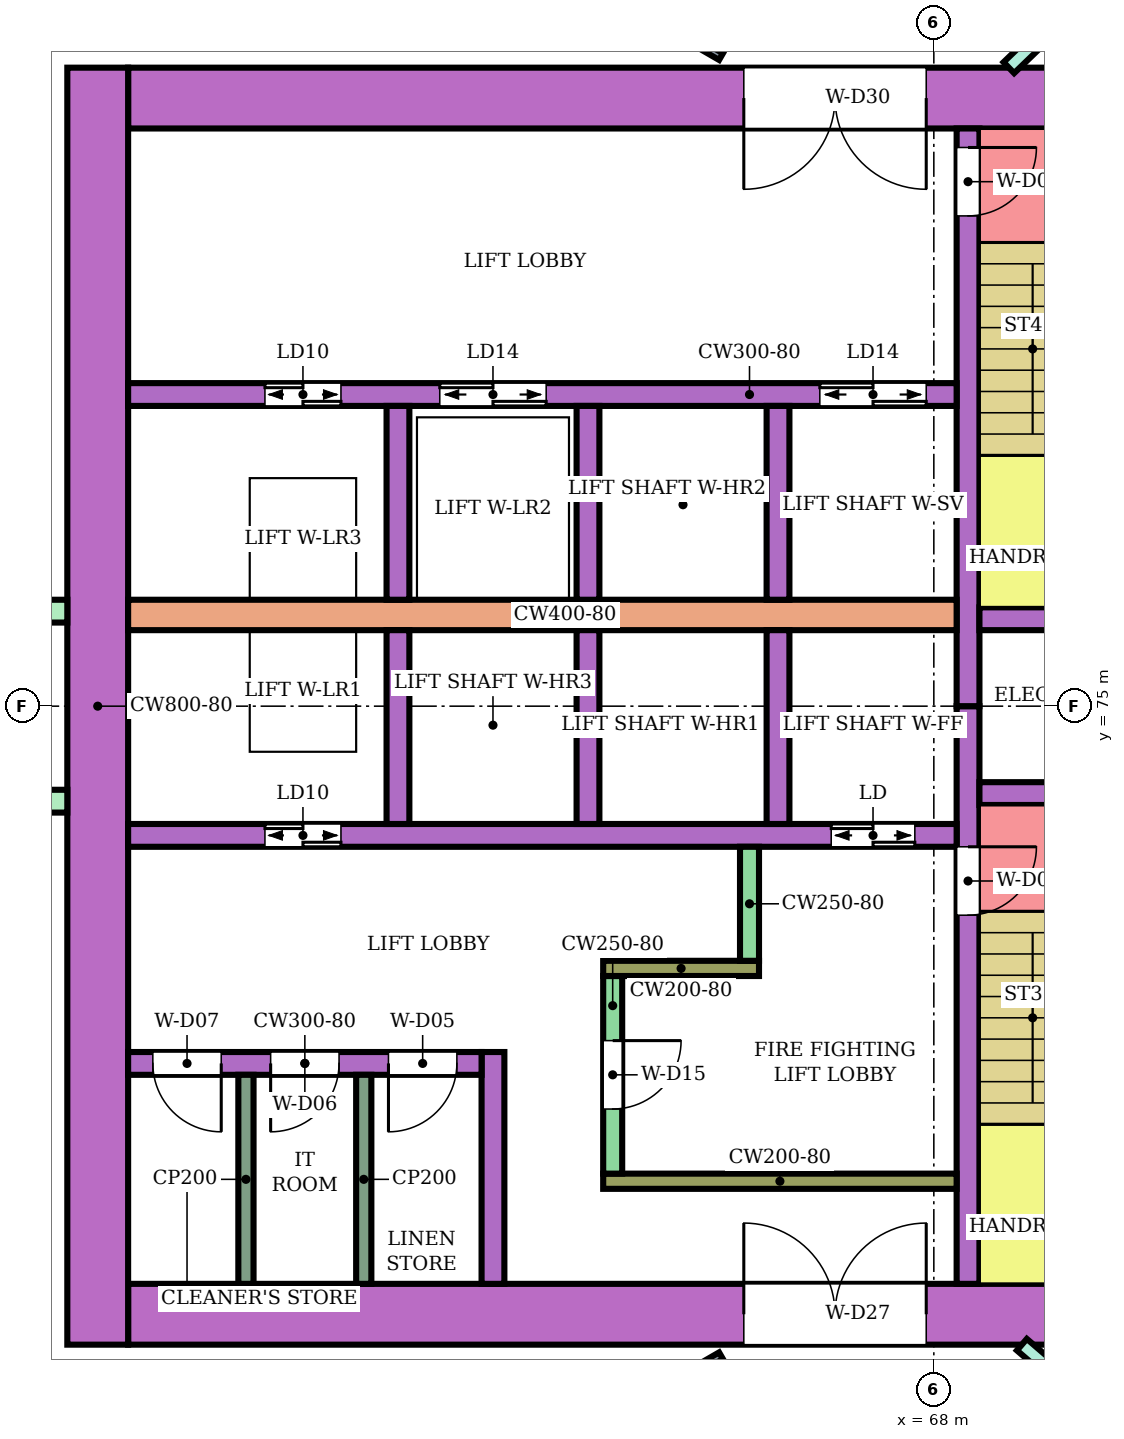
"""IFC4 building model, lengths in metres.
Left out: names, types, materials, properties, quantities, classifications, styles, units other than length and angle.
Written with IfcOpenShell. Run it as: python <this file> out.ifc"""

import sys

from ifc_helpers import new_model, si_unit, direction, frame, frame_2d, origin, place, context, subcontext, project, spatial, rectangle, extrude, element, fill, save


model = new_model("IFC4")
c1 = context("Model", 3, precision=1e-05, world=origin(), true_north=direction((0.0, 1.0)))
c2 = subcontext(c1, "Body", "Model", "MODEL_VIEW")
j1 = project(units=[si_unit("LENGTHUNIT", "METRE"), si_unit("PLANEANGLEUNIT", "RADIAN")], contexts=[c1])
p1 = place(None, origin())
s1 = spatial("IfcSite", under=j1, at=p1, CompositionType="ELEMENT")
p2 = place(p1, origin())
s2 = spatial("IfcBuilding", under=s1, at=p2, CompositionType="ELEMENT")
p3 = place(p2, frame((0.0, 0.0, 51.6)))
s3 = spatial("IfcBuildingStorey", under=s2, at=p3, CompositionType="ELEMENT", Elevation=51.6)
p4 = place(p3, frame((72.1, 67.0, 0.0), z_axis=(0.0, 0.0, 1.0), x_axis=(-1.0, 0.0, 0.0)))
e1 = element("IfcWall", 1, at=p4, inside=s3, PredefinedType="SHEAR", context=c2, shape_type="SweptSolid", body=[
    extrude(rectangle(XDim=14.7, YDim=0.8, at=frame_2d((7.35, 0.0))), origin(), (0.0, 0.0, 1.0), 3.48),
])
p5 = place(p4, frame((4.2, 0.0, 0.0)))
e2 = element("IfcOpeningElement", 2, at=p5, cuts=e1, PredefinedType="OPENING", context=c2, shape_type="SweptSolid", body=[
    extrude(rectangle(XDim=2.4, YDim=2.4, at=frame_2d((1.2, 1.2))), frame((0.0, 0.41, 0.0), z_axis=(0.0, -1.0, 0.0), x_axis=(1.0, 0.0, 0.0)), (0.0, 0.0, 1.0), 0.82),
])
p6 = place(p3, frame((72.1, 83.0, 0.0), z_axis=(0.0, 0.0, 1.0), x_axis=(-1.0, 0.0, 0.0)))
e3 = element("IfcWall", 3, at=p6, inside=s3, PredefinedType="SHEAR", context=c2, shape_type="SweptSolid", body=[
    extrude(rectangle(XDim=14.7, YDim=0.8, at=frame_2d((7.35, 0.0))), origin(), (0.0, 0.0, 1.0), 3.48),
])
p7 = place(p6, frame((4.2, 0.0, 0.0)))
e4 = element("IfcOpeningElement", 4, at=p7, cuts=e3, PredefinedType="OPENING", context=c2, shape_type="SweptSolid", body=[
    extrude(rectangle(XDim=2.4, YDim=2.4, at=frame_2d((1.2, 1.2))), frame((0.0, 0.41, 0.0), z_axis=(0.0, -1.0, 0.0), x_axis=(1.0, 0.0, 0.0)), (0.0, 0.0, 1.0), 0.82),
])
p8 = place(p3, frame((57.0, 83.4, 0.0), z_axis=(0.0, 0.0, 1.0), x_axis=(0.0, -1.0, 0.0)))
e5 = element("IfcWall", 5, at=p8, inside=s3, PredefinedType="SHEAR", context=c2, shape_type="SweptSolid", body=[
    extrude(rectangle(XDim=16.8, YDim=0.8, at=frame_2d((8.4, 0.0))), origin(), (0.0, 0.0, 1.0), 3.48),
])
p9 = place(p3, frame((68.45, 75.0, 0.0), z_axis=(0.0, 0.0, 1.0), x_axis=(0.0, -1.0, 0.0)))
e6 = element("IfcWall", 6, at=p9, inside=s3, PredefinedType="SHEAR", context=c2, shape_type="SweptSolid", body=[
    extrude(rectangle(XDim=7.6, YDim=0.3, at=frame_2d((3.8, 0.0))), origin(), (0.0, 0.0, 1.0), 3.48),
])
p10 = place(p9, frame((1.85, 0.0, 0.0)))
e7 = element("IfcOpeningElement", 7, at=p10, cuts=e6, PredefinedType="OPENING", context=c2, shape_type="SweptSolid", body=[
    extrude(rectangle(XDim=0.9, YDim=2.1, at=frame_2d((0.45, 1.05))), frame((0.0, 0.16, 0.0), z_axis=(0.0, -1.0, 0.0), x_axis=(1.0, 0.0, 0.0)), (0.0, 0.0, 1.0), 0.32),
])
p11 = place(p3, frame((68.45, 82.6, 0.0), z_axis=(0.0, 0.0, 1.0), x_axis=(0.0, -1.0, 0.0)))
e8 = element("IfcWall", 8, at=p11, inside=s3, PredefinedType="SHEAR", context=c2, shape_type="SweptSolid", body=[
    extrude(rectangle(XDim=7.6, YDim=0.3, at=frame_2d((3.8, 0.0))), origin(), (0.0, 0.0, 1.0), 3.48),
])
p12 = place(p11, frame((0.25, 0.0, 0.0)))
e9 = element("IfcOpeningElement", 9, at=p12, cuts=e8, PredefinedType="OPENING", context=c2, shape_type="SweptSolid", body=[
    extrude(rectangle(XDim=0.9, YDim=2.1, at=frame_2d((0.45, 1.05))), frame((0.0, 0.16, 0.0), z_axis=(0.0, -1.0, 0.0), x_axis=(1.0, 0.0, 0.0)), (0.0, 0.0, 1.0), 0.32),
])
p13 = place(p3, frame((71.65, 73.85, 0.0), z_axis=(0.0, 0.0, 1.0), x_axis=(-1.0, 0.0, 0.0)))
e10 = element("IfcWall", 10, at=p13, inside=s3, PredefinedType="SHEAR", context=c2, shape_type="SweptSolid", body=[
    extrude(rectangle(XDim=3.05, YDim=0.3, at=frame_2d((1.525, 0.0))), origin(), (0.0, 0.0, 1.0), 3.48),
])
p14 = place(p13, frame((1.1, 0.0, 0.0)))
e11 = element("IfcOpeningElement", 11, at=p14, cuts=e10, PredefinedType="OPENING", context=c2, shape_type="SweptSolid", body=[
    extrude(rectangle(XDim=0.7, YDim=2.0, at=frame_2d((0.35, 1.0))), frame((0.0, 0.16, 0.0), z_axis=(0.0, -1.0, 0.0), x_axis=(1.0, 0.0, 0.0)), (0.0, 0.0, 1.0), 0.32),
])
p15 = place(p3, frame((71.65, 76.15, 0.0), z_axis=(0.0, 0.0, 1.0), x_axis=(-1.0, 0.0, 0.0)))
e12 = element("IfcWall", 12, at=p15, inside=s3, PredefinedType="SHEAR", context=c2, shape_type="SweptSolid", body=[
    extrude(rectangle(XDim=3.05, YDim=0.3, at=frame_2d((1.525, 0.0))), origin(), (0.0, 0.0, 1.0), 3.48),
])
p16 = place(p3, frame((68.3, 73.3, 0.0), z_axis=(0.0, 0.0, 1.0), x_axis=(-1.0, 0.0, 0.0)))
e13 = element("IfcWall", 13, at=p16, inside=s3, PredefinedType="SHEAR", context=c2, shape_type="SweptSolid", body=[
    extrude(rectangle(XDim=10.9, YDim=0.3, at=frame_2d((5.45, 0.0))), origin(), (0.0, 0.0, 1.0), 3.48),
])
p17 = place(p16, frame((0.55, 0.0, 0.0)))
e14 = element("IfcOpeningElement", 14, at=p17, cuts=e13, PredefinedType="OPENING", context=c2, shape_type="SweptSolid", body=[
    extrude(rectangle(XDim=1.1, YDim=2.1, at=frame_2d((0.55, 1.05))), frame((0.0, 0.16, 0.0), z_axis=(0.0, -1.0, 0.0), x_axis=(1.0, 0.0, 0.0)), (0.0, 0.0, 1.0), 0.32),
])
p18 = place(p16, frame((8.1, 0.0, 0.0)))
e15 = element("IfcOpeningElement", 15, at=p18, cuts=e13, PredefinedType="OPENING", context=c2, shape_type="SweptSolid", body=[
    extrude(rectangle(XDim=1.0, YDim=2.1, at=frame_2d((0.5, 1.05))), frame((0.0, 0.16, 0.0), z_axis=(0.0, -1.0, 0.0), x_axis=(1.0, 0.0, 0.0)), (0.0, 0.0, 1.0), 0.32),
])
p19 = place(p3, frame((68.3, 76.2, 0.0), z_axis=(0.0, 0.0, 1.0), x_axis=(-1.0, 0.0, 0.0)))
e16 = element("IfcWall", 16, at=p19, inside=s3, PredefinedType="SHEAR", context=c2, shape_type="SweptSolid", body=[
    extrude(rectangle(XDim=10.9, YDim=0.4, at=frame_2d((5.45, 0.0))), origin(), (0.0, 0.0, 1.0), 3.48),
])
p20 = place(p3, frame((68.3, 79.1, 0.0), z_axis=(0.0, 0.0, 1.0), x_axis=(-1.0, 0.0, 0.0)))
e17 = element("IfcWall", 17, at=p20, inside=s3, PredefinedType="SHEAR", context=c2, shape_type="SweptSolid", body=[
    extrude(rectangle(XDim=10.9, YDim=0.3, at=frame_2d((5.45, 0.0))), origin(), (0.0, 0.0, 1.0), 3.48),
])
p21 = place(p20, frame((0.4, 0.0, 0.0)))
e18 = element("IfcOpeningElement", 18, at=p21, cuts=e17, PredefinedType="OPENING", context=c2, shape_type="SweptSolid", body=[
    extrude(rectangle(XDim=1.4, YDim=2.1, at=frame_2d((0.7, 1.05))), frame((0.0, 0.16, 0.0), z_axis=(0.0, -1.0, 0.0), x_axis=(1.0, 0.0, 0.0)), (0.0, 0.0, 1.0), 0.32),
])
p22 = place(p20, frame((5.4, 0.0, 0.0)))
e19 = element("IfcOpeningElement", 19, at=p22, cuts=e17, PredefinedType="OPENING", context=c2, shape_type="SweptSolid", body=[
    extrude(rectangle(XDim=1.4, YDim=2.1, at=frame_2d((0.7, 1.05))), frame((0.0, 0.16, 0.0), z_axis=(0.0, -1.0, 0.0), x_axis=(1.0, 0.0, 0.0)), (0.0, 0.0, 1.0), 0.32),
])
p23 = place(p20, frame((8.1, 0.0, 0.0)))
e20 = element("IfcOpeningElement", 20, at=p23, cuts=e17, PredefinedType="OPENING", context=c2, shape_type="SweptSolid", body=[
    extrude(rectangle(XDim=1.0, YDim=2.1, at=frame_2d((0.5, 1.05))), frame((0.0, 0.16, 0.0), z_axis=(0.0, -1.0, 0.0), x_axis=(1.0, 0.0, 0.0)), (0.0, 0.0, 1.0), 0.32),
])
for number, where, z_axis, x_axis in (
    (21, (65.95, 76.0, 0.0), (0.0, 0.0, 1.0), (0.0, -1.0, 0.0)),
    (22, (63.45, 76.0, 0.0), (0.0, 0.0, 1.0), (0.0, -1.0, 0.0)),
    (23, (60.95, 76.0, 0.0), (0.0, 0.0, 1.0), (0.0, -1.0, 0.0)),
    (24, (65.95, 78.95, 0.0), (0.0, 0.0, 1.0), (0.0, -1.0, 0.0)),
    (25, (63.45, 78.95, 0.0), (0.0, 0.0, 1.0), (0.0, -1.0, 0.0)),
    (26, (60.95, 78.95, 0.0), (0.0, 0.0, 1.0), (0.0, -1.0, 0.0)),
):
    element("IfcWall", number, at=place(p3, frame(where, z_axis=z_axis, x_axis=x_axis)), inside=s3, PredefinedType="SHEAR", context=c2, shape_type="SweptSolid", body=[
        extrude(rectangle(XDim=2.55, YDim=0.3, at=frame_2d((1.275, 0.0))), origin(), (0.0, 0.0, 1.0), 3.48),
    ])
p24 = place(p3, frame((68.3, 68.75, 0.0), z_axis=(0.0, 0.0, 1.0), x_axis=(-1.0, 0.0, 0.0)))
e27 = element("IfcWall", 27, at=p24, inside=s3, PredefinedType="SHEAR", context=c2, shape_type="SweptSolid", body=[
    extrude(rectangle(XDim=4.65, YDim=0.2, at=frame_2d((2.325, 0.0))), origin(), (0.0, 0.0, 1.0), 3.48),
])
p25 = place(p3, frame((63.775, 71.45, 0.0), z_axis=(0.0, 0.0, 1.0), x_axis=(0.0, -1.0, 0.0)))
e28 = element("IfcWall", 28, at=p25, inside=s3, PredefinedType="SHEAR", context=c2, shape_type="SweptSolid", body=[
    extrude(rectangle(XDim=2.6, YDim=0.25, at=frame_2d((1.3, 0.0))), origin(), (0.0, 0.0, 1.0), 3.48),
])
p26 = place(p25, frame((0.85, 0.0, 0.0)))
e29 = element("IfcOpeningElement", 29, at=p26, cuts=e28, PredefinedType="OPENING", context=c2, shape_type="SweptSolid", body=[
    extrude(rectangle(XDim=0.9, YDim=2.1, at=frame_2d((0.45, 1.05))), frame((0.0, 0.135, 0.0), z_axis=(0.0, -1.0, 0.0), x_axis=(1.0, 0.0, 0.0)), (0.0, 0.0, 1.0), 0.27),
])
p27 = place(p3, frame((65.7, 71.55, 0.0), z_axis=(0.0, 0.0, 1.0), x_axis=(-1.0, 0.0, 0.0)))
e30 = element("IfcWall", 30, at=p27, inside=s3, PredefinedType="SHEAR", context=c2, shape_type="SweptSolid", body=[
    extrude(rectangle(XDim=2.05, YDim=0.2, at=frame_2d((1.025, 0.0))), origin(), (0.0, 0.0, 1.0), 3.48),
])
p28 = place(p3, frame((65.575, 73.15, 0.0), z_axis=(0.0, 0.0, 1.0), x_axis=(0.0, -1.0, 0.0)))
e31 = element("IfcWall", 31, at=p28, inside=s3, PredefinedType="SHEAR", context=c2, shape_type="SweptSolid", body=[
    extrude(rectangle(XDim=1.5, YDim=0.25, at=frame_2d((0.75, 0.0))), origin(), (0.0, 0.0, 1.0), 3.48),
])
p29 = place(p3, frame((62.2, 70.45, 0.0), z_axis=(0.0, 0.0, 1.0), x_axis=(0.0, -1.0, 0.0)))
e32 = element("IfcWall", 32, at=p29, inside=s3, PredefinedType="SHEAR", context=c2, shape_type="SweptSolid", body=[
    extrude(rectangle(XDim=3.05, YDim=0.3, at=frame_2d((1.525, 0.0))), origin(), (0.0, 0.0, 1.0), 3.48),
])
p30 = place(p3, frame((62.05, 70.3, 0.0), z_axis=(0.0, 0.0, 1.0), x_axis=(-1.0, 0.0, 0.0)))
e33 = element("IfcWall", 33, at=p30, inside=s3, PredefinedType="SHEAR", context=c2, shape_type="SweptSolid", body=[
    extrude(rectangle(XDim=4.65, YDim=0.3, at=frame_2d((2.325, 0.0))), origin(), (0.0, 0.0, 1.0), 3.48),
])
p31 = place(p30, frame((0.325, 0.0, 0.0)))
e34 = element("IfcOpeningElement", 34, at=p31, cuts=e33, PredefinedType="OPENING", context=c2, shape_type="SweptSolid", body=[
    extrude(rectangle(XDim=0.9, YDim=2.1, at=frame_2d((0.45, 1.05))), frame((0.0, 0.16, 0.0), z_axis=(0.0, -1.0, 0.0), x_axis=(1.0, 0.0, 0.0)), (0.0, 0.0, 1.0), 0.32),
])
p32 = place(p30, frame((1.875, 0.0, 0.0)))
e35 = element("IfcOpeningElement", 35, at=p32, cuts=e33, PredefinedType="OPENING", context=c2, shape_type="SweptSolid", body=[
    extrude(rectangle(XDim=0.9, YDim=2.1, at=frame_2d((0.45, 1.05))), frame((0.0, 0.16, 0.0), z_axis=(0.0, -1.0, 0.0), x_axis=(1.0, 0.0, 0.0)), (0.0, 0.0, 1.0), 0.32),
])
p33 = place(p30, frame((3.425, 0.0, 0.0)))
e36 = element("IfcOpeningElement", 36, at=p33, cuts=e33, PredefinedType="OPENING", context=c2, shape_type="SweptSolid", body=[
    extrude(rectangle(XDim=0.9, YDim=2.1, at=frame_2d((0.45, 1.05))), frame((0.0, 0.16, 0.0), z_axis=(0.0, -1.0, 0.0), x_axis=(1.0, 0.0, 0.0)), (0.0, 0.0, 1.0), 0.32),
])
for number, where, z_axis, x_axis in (
    (37, (56.6, 76.25, 0.0), (0.0, 0.0, 1.0), (-1.0, 0.0, 0.0)),
    (38, (56.6, 73.75, 0.0), (0.0, 0.0, 1.0), (-1.0, 0.0, 0.0)),
):
    element("IfcWall", number, at=place(p3, frame(where, z_axis=z_axis, x_axis=x_axis)), inside=s3, PredefinedType="NOTDEFINED", context=c2, shape_type="SweptSolid", body=[
        extrude(rectangle(XDim=2.416, YDim=0.3, at=frame_2d((1.208, 0.0))), origin(), (0.0, 0.0, 1.0), 3.8),
    ])
p34 = place(p3, frame((68.987, 83.4, 0.0), z_axis=(0.0, 0.0, 1.0), x_axis=(0.719547721855, 0.694442996922, 0.0)))
e39 = element("IfcWall", 39, at=p34, inside=s3, PredefinedType="PARTITIONING", context=c2, shape_type="SweptSolid", body=[
    extrude(rectangle(XDim=5.378, YDim=0.2, at=frame_2d((2.689, 0.0))), origin(), (0.0, 0.0, 1.0), 3.35),
])
p35 = place(p34, frame((2.294, 0.0, 0.0)))
e40 = element("IfcOpeningElement", 40, at=p35, cuts=e39, PredefinedType="OPENING", context=c2, shape_type="SweptSolid", body=[
    extrude(rectangle(XDim=0.9, YDim=2.1, at=frame_2d((0.45, 1.05))), frame((0.0, 0.11, 0.0), z_axis=(0.0, -1.0, 0.0), x_axis=(1.0, 0.0, 0.0)), (0.0, 0.0, 1.0), 0.22),
])
p36 = place(p3, frame((69.158, 66.6, 0.0), z_axis=(0.0, 0.0, 1.0), x_axis=(0.757976058094, -0.652282373943, 0.0)))
e41 = element("IfcWall", 41, at=p36, inside=s3, PredefinedType="PARTITIONING", context=c2, shape_type="SweptSolid", body=[
    extrude(rectangle(XDim=5.16, YDim=0.2, at=frame_2d((2.58, 0.0))), origin(), (0.0, 0.0, 1.0), 3.35),
])
p37 = place(p36, frame((1.6, 0.0, 0.0)))
e42 = element("IfcOpeningElement", 42, at=p37, cuts=e41, PredefinedType="OPENING", context=c2, shape_type="SweptSolid", body=[
    extrude(rectangle(XDim=1.0, YDim=2.1, at=frame_2d((0.5, 1.05))), frame((0.0, 0.11, 0.0), z_axis=(0.0, -1.0, 0.0), x_axis=(1.0, 0.0, 0.0)), (0.0, 0.0, 1.0), 0.22),
])
p38 = place(p3, frame((57.659, 62.101, 0.0), z_axis=(0.0, 0.0, 1.0), x_axis=(0.86602264145, 0.500004784474, 0.0)))
e43 = element("IfcWall", 43, at=p38, inside=s3, PredefinedType="PARTITIONING", context=c2, shape_type="SweptSolid", body=[
    extrude(rectangle(XDim=8.708, YDim=0.1, at=frame_2d((4.354, 0.0))), origin(), (0.0, 0.0, 1.0), 3.35),
])
p39 = place(p38, frame((3.929, 0.0, 0.0)))
e44 = element("IfcOpeningElement", 44, at=p39, cuts=e43, PredefinedType="OPENING", context=c2, shape_type="SweptSolid", body=[
    extrude(rectangle(XDim=0.9, YDim=2.1, at=frame_2d((0.45, 1.05))), frame((0.0, 0.06, 0.0), z_axis=(0.0, -1.0, 0.0), x_axis=(1.0, 0.0, 0.0)), (0.0, 0.0, 1.0), 0.12),
])
p40 = place(p3, frame((57.659, 87.899, 0.0), z_axis=(0.0, 0.0, 1.0), x_axis=(0.86602264145, -0.500004784474, 0.0)))
e45 = element("IfcWall", 45, at=p40, inside=s3, PredefinedType="PARTITIONING", context=c2, shape_type="SweptSolid", body=[
    extrude(rectangle(XDim=8.708, YDim=0.1, at=frame_2d((4.354, 0.0))), origin(), (0.0, 0.0, 1.0), 3.35),
])
p41 = place(p40, frame((3.929, 0.0, 0.0)))
e46 = element("IfcOpeningElement", 46, at=p41, cuts=e45, PredefinedType="OPENING", context=c2, shape_type="SweptSolid", body=[
    extrude(rectangle(XDim=0.9, YDim=2.1, at=frame_2d((0.45, 1.05))), frame((0.0, 0.06, 0.0), z_axis=(0.0, -1.0, 0.0), x_axis=(1.0, 0.0, 0.0)), (0.0, 0.0, 1.0), 0.12),
])
for number, where, z_axis, x_axis in (
    (47, (60.5, 70.15, 0.0), (0.0, 0.0, 1.0), (0.0, -1.0, 0.0)),
    (48, (58.95, 70.15, 0.0), (0.0, 0.0, 1.0), (0.0, -1.0, 0.0)),
):
    element("IfcWall", number, at=place(p3, frame(where, z_axis=z_axis, x_axis=x_axis)), inside=s3, PredefinedType="PARTITIONING", context=c2, shape_type="SweptSolid", body=[
        extrude(rectangle(XDim=2.75, YDim=0.2, at=frame_2d((1.375, 0.0))), origin(), (0.0, 0.0, 1.0), 3.48),
    ])
p42 = place(p10, origin())
e49 = element("IfcDoor", 49, at=p42, inside=s3, OperationType="SINGLE_SWING_LEFT", PredefinedType="DOOR", context=c2, shape_type="SweptSolid", body=[
    extrude(rectangle(XDim=0.9, YDim=2.1, at=frame_2d((0.45, 1.05))), frame((0.0, 0.025, 0.0), z_axis=(0.0, -1.0, 0.0), x_axis=(1.0, 0.0, 0.0)), (0.0, 0.0, 1.0), 0.05),
])
fill(e7, e49)
p43 = place(p12, origin())
e50 = element("IfcDoor", 50, at=p43, inside=s3, OperationType="SINGLE_SWING_LEFT", PredefinedType="DOOR", context=c2, shape_type="SweptSolid", body=[
    extrude(rectangle(XDim=0.9, YDim=2.1, at=frame_2d((0.45, 1.05))), frame((0.0, 0.025, 0.0), z_axis=(0.0, -1.0, 0.0), x_axis=(1.0, 0.0, 0.0)), (0.0, 0.0, 1.0), 0.05),
])
fill(e9, e50)
p44 = place(p17, origin())
e51 = element("IfcDoor", 51, at=p44, inside=s3, OperationType="DOUBLE_DOOR_SLIDING", PredefinedType="DOOR", context=c2, shape_type="SweptSolid", body=[
    extrude(rectangle(XDim=1.1, YDim=2.1, at=frame_2d((0.55, 1.05))), frame((0.0, 0.025, 0.0), z_axis=(0.0, -1.0, 0.0), x_axis=(1.0, 0.0, 0.0)), (0.0, 0.0, 1.0), 0.05),
])
fill(e14, e51)
p45 = place(p18, origin())
e52 = element("IfcDoor", 52, at=p45, inside=s3, OperationType="DOUBLE_DOOR_SLIDING", PredefinedType="DOOR", context=c2, shape_type="SweptSolid", body=[
    extrude(rectangle(XDim=1.0, YDim=2.1, at=frame_2d((0.5, 1.05))), frame((0.0, 0.025, 0.0), z_axis=(0.0, -1.0, 0.0), x_axis=(1.0, 0.0, 0.0)), (0.0, 0.0, 1.0), 0.05),
])
fill(e15, e52)
p46 = place(p21, origin())
e53 = element("IfcDoor", 53, at=p46, inside=s3, OperationType="DOUBLE_DOOR_SLIDING", PredefinedType="DOOR", context=c2, shape_type="SweptSolid", body=[
    extrude(rectangle(XDim=1.4, YDim=2.1, at=frame_2d((0.7, 1.05))), frame((0.0, 0.025, 0.0), z_axis=(0.0, -1.0, 0.0), x_axis=(1.0, 0.0, 0.0)), (0.0, 0.0, 1.0), 0.05),
])
fill(e18, e53)
p47 = place(p22, origin())
e54 = element("IfcDoor", 54, at=p47, inside=s3, OperationType="DOUBLE_DOOR_SLIDING", PredefinedType="DOOR", context=c2, shape_type="SweptSolid", body=[
    extrude(rectangle(XDim=1.4, YDim=2.1, at=frame_2d((0.7, 1.05))), frame((0.0, 0.025, 0.0), z_axis=(0.0, -1.0, 0.0), x_axis=(1.0, 0.0, 0.0)), (0.0, 0.0, 1.0), 0.05),
])
fill(e19, e54)
p48 = place(p23, origin())
e55 = element("IfcDoor", 55, at=p48, inside=s3, OperationType="DOUBLE_DOOR_SLIDING", PredefinedType="DOOR", context=c2, shape_type="SweptSolid", body=[
    extrude(rectangle(XDim=1.0, YDim=2.1, at=frame_2d((0.5, 1.05))), frame((0.0, 0.025, 0.0), z_axis=(0.0, -1.0, 0.0), x_axis=(1.0, 0.0, 0.0)), (0.0, 0.0, 1.0), 0.05),
])
fill(e20, e55)
p49 = place(p26, origin())
e56 = element("IfcDoor", 56, at=p49, inside=s3, OperationType="SINGLE_SWING_LEFT", PredefinedType="DOOR", context=c2, shape_type="SweptSolid", body=[
    extrude(rectangle(XDim=0.9, YDim=2.1, at=frame_2d((0.45, 1.05))), frame((0.0, 0.025, 0.0), z_axis=(0.0, -1.0, 0.0), x_axis=(1.0, 0.0, 0.0)), (0.0, 0.0, 1.0), 0.05),
])
fill(e29, e56)
p50 = place(p31, origin())
e57 = element("IfcDoor", 57, at=p50, inside=s3, OperationType="SINGLE_SWING_RIGHT", PredefinedType="DOOR", context=c2, shape_type="SweptSolid", body=[
    extrude(rectangle(XDim=0.9, YDim=2.1, at=frame_2d((0.45, 1.05))), frame((0.0, 0.025, 0.0), z_axis=(0.0, -1.0, 0.0), x_axis=(1.0, 0.0, 0.0)), (0.0, 0.0, 1.0), 0.05),
])
fill(e34, e57)
p51 = place(p32, origin())
e58 = element("IfcDoor", 58, at=p51, inside=s3, OperationType="SINGLE_SWING_RIGHT", PredefinedType="DOOR", context=c2, shape_type="SweptSolid", body=[
    extrude(rectangle(XDim=0.9, YDim=2.1, at=frame_2d((0.45, 1.05))), frame((0.0, 0.025, 0.0), z_axis=(0.0, -1.0, 0.0), x_axis=(1.0, 0.0, 0.0)), (0.0, 0.0, 1.0), 0.05),
])
fill(e35, e58)
p52 = place(p33, origin())
e59 = element("IfcDoor", 59, at=p52, inside=s3, OperationType="SINGLE_SWING_LEFT", PredefinedType="DOOR", context=c2, shape_type="SweptSolid", body=[
    extrude(rectangle(XDim=0.9, YDim=2.1, at=frame_2d((0.45, 1.05))), frame((0.0, 0.025, 0.0), z_axis=(0.0, -1.0, 0.0), x_axis=(1.0, 0.0, 0.0)), (0.0, 0.0, 1.0), 0.05),
])
fill(e36, e59)
p53 = place(p5, frame((2.4, 0.0, 0.0), z_axis=(0.0, 0.0, 1.0), x_axis=(-1.0, 0.0, 0.0)))
e60 = element("IfcDoor", 60, at=p53, inside=s3, OperationType="DOUBLE_DOOR_SINGLE_SWING", PredefinedType="DOOR", context=c2, shape_type="SweptSolid", body=[
    extrude(rectangle(XDim=2.4, YDim=2.4, at=frame_2d((1.2, 1.2))), frame((0.0, 0.025, 0.0), z_axis=(0.0, -1.0, 0.0), x_axis=(1.0, 0.0, 0.0)), (0.0, 0.0, 1.0), 0.05),
])
fill(e2, e60)
p54 = place(p7, origin())
e61 = element("IfcDoor", 61, at=p54, inside=s3, OperationType="DOUBLE_DOOR_SINGLE_SWING", PredefinedType="DOOR", context=c2, shape_type="SweptSolid", body=[
    extrude(rectangle(XDim=2.4, YDim=2.4, at=frame_2d((1.2, 1.2))), frame((0.0, 0.025, 0.0), z_axis=(0.0, -1.0, 0.0), x_axis=(1.0, 0.0, 0.0)), (0.0, 0.0, 1.0), 0.05),
])
fill(e4, e61)
save(model, sys.argv[1])
